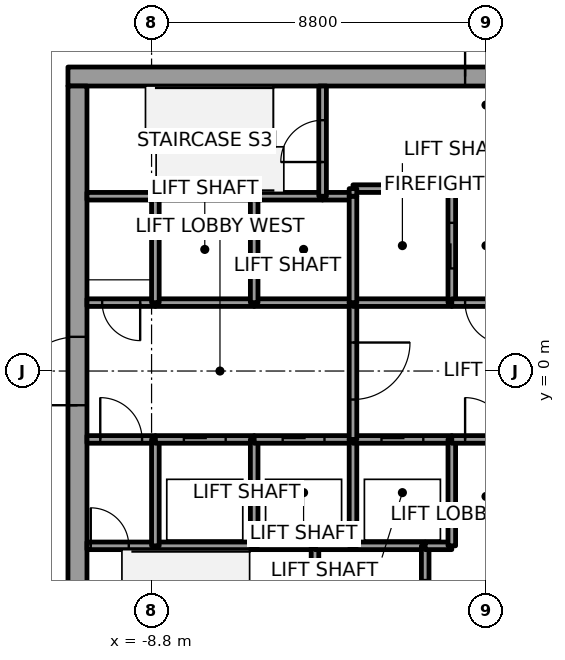
"""IFC4 building model, lengths in metres.
Left out: names, types, materials, properties, quantities, classifications, styles, units other than length and angle.
Written with IfcOpenShell. Run it as: python <this file> out.ifc"""

import sys

from ifc_helpers import new_model, si_unit, direction, frame, frame_2d, origin, place, context, subcontext, project, spatial, rectangle, extrude, element, fill, save


model = new_model("IFC4")
c1 = context("Model", 3, precision=1e-05, world=origin(), true_north=direction((0.0, 1.0)))
c2 = subcontext(c1, "Body", "Model", "MODEL_VIEW")
j1 = project(units=[si_unit("LENGTHUNIT", "METRE"), si_unit("PLANEANGLEUNIT", "RADIAN")], contexts=[c1])
p1 = place(None, origin())
s1 = spatial("IfcSite", under=j1, at=p1, CompositionType="ELEMENT")
p2 = place(p1, origin())
s2 = spatial("IfcBuilding", under=s1, at=p2, CompositionType="ELEMENT")
p3 = place(p2, frame((0.0, 0.0, 209.8)))
s3 = spatial("IfcBuildingStorey", under=s2, at=p3, CompositionType="ELEMENT", Elevation=209.8)
p4 = place(p3, frame((-11.0, 7.75, 0.0), z_axis=(0.0, 0.0, 1.0), x_axis=(1.0, 0.0, 0.0)))
e1 = element("IfcWall", 1, at=p4, inside=s3, PredefinedType="SHEAR", context=c2, shape_type="SweptSolid", body=[
    extrude(rectangle(XDim=22.0, YDim=0.5, at=frame_2d((11.0, 0.0))), origin(), (0.0, 0.0, 1.0), 4.0),
])
p5 = place(p4, frame((10.45, 0.0, 0.0)))
e2 = element("IfcOpeningElement", 2, at=p5, cuts=e1, PredefinedType="OPENING", context=c2, shape_type="SweptSolid", body=[
    extrude(rectangle(XDim=1.1, YDim=2.1, at=frame_2d((0.55, 1.05))), frame((0.0, 0.25, 0.0), z_axis=(0.0, -1.0, 0.0), x_axis=(1.0, 0.0, 0.0)), (0.0, 0.0, 1.0), 0.5),
])
p6 = place(p3, frame((-10.75, -7.5, 0.0), z_axis=(0.0, 0.0, 1.0), x_axis=(0.0, 1.0, 0.0)))
e3 = element("IfcWall", 3, at=p6, inside=s3, PredefinedType="SHEAR", context=c2, shape_type="SweptSolid", body=[
    extrude(rectangle(XDim=15.0, YDim=0.5, at=frame_2d((7.5, 0.0))), origin(), (0.0, 0.0, 1.0), 4.0),
])
p7 = place(p6, frame((6.6, 0.0, 0.0)))
e4 = element("IfcOpeningElement", 4, at=p7, cuts=e3, PredefinedType="OPENING", context=c2, shape_type="SweptSolid", body=[
    extrude(rectangle(XDim=1.8, YDim=2.1, at=frame_2d((0.9, 1.05))), frame((0.0, 0.25, 0.0), z_axis=(0.0, -1.0, 0.0), x_axis=(1.0, 0.0, 0.0)), (0.0, 0.0, 1.0), 0.5),
])
p8 = place(p3, frame((-10.5, -4.6, 0.0), z_axis=(0.0, 0.0, 1.0), x_axis=(1.0, 0.0, 0.0)))
e5 = element("IfcWall", 5, at=p8, inside=s3, PredefinedType="SOLIDWALL", context=c2, shape_type="SweptSolid", body=[
    extrude(rectangle(XDim=1.8, YDim=0.2, at=frame_2d((0.9, 0.0))), origin(), (0.0, 0.0, 1.0), 3.85),
])
p9 = place(p8, frame((0.1, 0.0, 0.0)))
e6 = element("IfcOpeningElement", 6, at=p9, cuts=e5, PredefinedType="OPENING", context=c2, shape_type="SweptSolid", body=[
    extrude(rectangle(XDim=1.0, YDim=2.1, at=frame_2d((0.5, 1.05))), frame((0.0, 0.1, 0.0), z_axis=(0.0, -1.0, 0.0), x_axis=(1.0, 0.0, 0.0)), (0.0, 0.0, 1.0), 0.2),
])
p10 = place(p3, frame((-10.5, -1.8, 0.0), z_axis=(0.0, 0.0, 1.0), x_axis=(1.0, 0.0, 0.0)))
e7 = element("IfcWall", 7, at=p10, inside=s3, PredefinedType="SOLIDWALL", context=c2, shape_type="SweptSolid", body=[
    extrude(rectangle(XDim=1.8, YDim=0.2, at=frame_2d((0.9, 0.0))), origin(), (0.0, 0.0, 1.0), 3.85),
])
p11 = place(p10, frame((0.35, 0.0, 0.0)))
e8 = element("IfcOpeningElement", 8, at=p11, cuts=e7, PredefinedType="OPENING", context=c2, shape_type="SweptSolid", body=[
    extrude(rectangle(XDim=1.1, YDim=2.1, at=frame_2d((0.55, 1.05))), frame((0.0, 0.1, 0.0), z_axis=(0.0, -1.0, 0.0), x_axis=(1.0, 0.0, 0.0)), (0.0, 0.0, 1.0), 0.2),
])
p12 = place(p3, frame((-8.7, 1.8, 0.0), z_axis=(0.0, 0.0, 1.0), x_axis=(-1.0, 0.0, 0.0)))
e9 = element("IfcWall", 9, at=p12, inside=s3, PredefinedType="SOLIDWALL", context=c2, shape_type="SweptSolid", body=[
    extrude(rectangle(XDim=1.8, YDim=0.2, at=frame_2d((0.9, 0.0))), origin(), (0.0, 0.0, 1.0), 3.85),
])
p13 = place(p12, frame((0.4, 0.0, 0.0)))
e10 = element("IfcOpeningElement", 10, at=p13, cuts=e9, PredefinedType="OPENING", context=c2, shape_type="SweptSolid", body=[
    extrude(rectangle(XDim=1.0, YDim=2.1, at=frame_2d((0.5, 1.05))), frame((0.0, 0.1, 0.0), z_axis=(0.0, -1.0, 0.0), x_axis=(1.0, 0.0, 0.0)), (0.0, 0.0, 1.0), 0.2),
])
p14 = place(p3, frame((-8.7, 4.6, 0.0), z_axis=(0.0, 0.0, 1.0), x_axis=(-1.0, 0.0, 0.0)))
e11 = element("IfcWall", 11, at=p14, inside=s3, PredefinedType="SOLIDWALL", context=c2, shape_type="SweptSolid", body=[
    extrude(rectangle(XDim=1.8, YDim=0.2, at=frame_2d((0.9, 0.0))), origin(), (0.0, 0.0, 1.0), 3.85),
])
p15 = place(p3, frame((-8.7, -4.6, 0.0), z_axis=(0.0, 0.0, 1.0), x_axis=(1.0, 0.0, 0.0)))
e12 = element("IfcWall", 12, at=p15, inside=s3, PredefinedType="SOLIDWALL", context=c2, shape_type="SweptSolid", body=[
    extrude(rectangle(XDim=2.6, YDim=0.2, at=frame_2d((1.3, 0.0))), origin(), (0.0, 0.0, 1.0), 3.85),
])
p16 = place(p3, frame((-8.7, -4.6, 0.0), z_axis=(0.0, 0.0, 1.0), x_axis=(0.0, 1.0, 0.0)))
e13 = element("IfcWall", 13, at=p16, inside=s3, PredefinedType="SOLIDWALL", context=c2, shape_type="SweptSolid", body=[
    extrude(rectangle(XDim=2.8, YDim=0.2, at=frame_2d((1.4, 0.0))), origin(), (0.0, 0.0, 1.0), 3.85),
])
p17 = place(p3, frame((-8.7, -1.8, 0.0), z_axis=(0.0, 0.0, 1.0), x_axis=(1.0, 0.0, 0.0)))
e14 = element("IfcWall", 14, at=p17, inside=s3, PredefinedType="SOLIDWALL", context=c2, shape_type="SweptSolid", body=[
    extrude(rectangle(XDim=2.6, YDim=0.2, at=frame_2d((1.3, 0.0))), origin(), (0.0, 0.0, 1.0), 3.85),
])
p18 = place(p17, frame((0.75, 0.0, 0.0)))
e15 = element("IfcOpeningElement", 15, at=p18, cuts=e14, PredefinedType="OPENING", context=c2, shape_type="SweptSolid", body=[
    extrude(rectangle(XDim=1.1, YDim=2.1, at=frame_2d((0.55, 1.05))), frame((0.0, 0.1, 0.0), z_axis=(0.0, -1.0, 0.0), x_axis=(1.0, 0.0, 0.0)), (0.0, 0.0, 1.0), 0.2),
])
p19 = place(p3, frame((-6.1, 1.8, 0.0), z_axis=(0.0, 0.0, 1.0), x_axis=(-1.0, 0.0, 0.0)))
e16 = element("IfcWall", 16, at=p19, inside=s3, PredefinedType="SOLIDWALL", context=c2, shape_type="SweptSolid", body=[
    extrude(rectangle(XDim=2.6, YDim=0.2, at=frame_2d((1.3, 0.0))), origin(), (0.0, 0.0, 1.0), 3.85),
])
p20 = place(p3, frame((-8.7, 1.8, 0.0), z_axis=(0.0, 0.0, 1.0), x_axis=(0.0, 1.0, 0.0)))
e17 = element("IfcWall", 17, at=p20, inside=s3, PredefinedType="SOLIDWALL", context=c2, shape_type="SweptSolid", body=[
    extrude(rectangle(XDim=2.8, YDim=0.2, at=frame_2d((1.4, 0.0))), origin(), (0.0, 0.0, 1.0), 3.85),
])
p21 = place(p3, frame((-6.1, 4.6, 0.0), z_axis=(0.0, 0.0, 1.0), x_axis=(-1.0, 0.0, 0.0)))
e18 = element("IfcWall", 18, at=p21, inside=s3, PredefinedType="SOLIDWALL", context=c2, shape_type="SweptSolid", body=[
    extrude(rectangle(XDim=2.6, YDim=0.2, at=frame_2d((1.3, 0.0))), origin(), (0.0, 0.0, 1.0), 3.85),
])
p22 = place(p3, frame((-6.1, -4.6, 0.0), z_axis=(0.0, 0.0, 1.0), x_axis=(1.0, 0.0, 0.0)))
e19 = element("IfcWall", 19, at=p22, inside=s3, PredefinedType="SOLIDWALL", context=c2, shape_type="SweptSolid", body=[
    extrude(rectangle(XDim=1.6, YDim=0.2, at=frame_2d((0.8, 0.0))), origin(), (0.0, 0.0, 1.0), 3.85),
])
p23 = place(p3, frame((-6.1, -4.6, 0.0), z_axis=(0.0, 0.0, 1.0), x_axis=(0.0, 1.0, 0.0)))
e20 = element("IfcWall", 20, at=p23, inside=s3, PredefinedType="SOLIDWALL", context=c2, shape_type="SweptSolid", body=[
    extrude(rectangle(XDim=2.8, YDim=0.2, at=frame_2d((1.4, 0.0))), origin(), (0.0, 0.0, 1.0), 3.85),
])
p24 = place(p3, frame((-6.1, -1.8, 0.0), z_axis=(0.0, 0.0, 1.0), x_axis=(1.0, 0.0, 0.0)))
e21 = element("IfcWall", 21, at=p24, inside=s3, PredefinedType="SOLIDWALL", context=c2, shape_type="SweptSolid", body=[
    extrude(rectangle(XDim=2.6, YDim=0.2, at=frame_2d((1.3, 0.0))), origin(), (0.0, 0.0, 1.0), 3.85),
])
p25 = place(p24, frame((0.75, 0.0, 0.0)))
e22 = element("IfcOpeningElement", 22, at=p25, cuts=e21, PredefinedType="OPENING", context=c2, shape_type="SweptSolid", body=[
    extrude(rectangle(XDim=1.1, YDim=2.1, at=frame_2d((0.55, 1.05))), frame((0.0, 0.1, 0.0), z_axis=(0.0, -1.0, 0.0), x_axis=(1.0, 0.0, 0.0)), (0.0, 0.0, 1.0), 0.2),
])
p26 = place(p3, frame((-3.5, 1.8, 0.0), z_axis=(0.0, 0.0, 1.0), x_axis=(-1.0, 0.0, 0.0)))
e23 = element("IfcWall", 23, at=p26, inside=s3, PredefinedType="SOLIDWALL", context=c2, shape_type="SweptSolid", body=[
    extrude(rectangle(XDim=2.6, YDim=0.2, at=frame_2d((1.3, 0.0))), origin(), (0.0, 0.0, 1.0), 3.85),
])
p27 = place(p3, frame((-6.1, 1.8, 0.0), z_axis=(0.0, 0.0, 1.0), x_axis=(0.0, 1.0, 0.0)))
e24 = element("IfcWall", 24, at=p27, inside=s3, PredefinedType="SOLIDWALL", context=c2, shape_type="SweptSolid", body=[
    extrude(rectangle(XDim=2.8, YDim=0.2, at=frame_2d((1.4, 0.0))), origin(), (0.0, 0.0, 1.0), 3.85),
])
p28 = place(p3, frame((-4.3, 4.6, 0.0), z_axis=(0.0, 0.0, 1.0), x_axis=(-1.0, 0.0, 0.0)))
e25 = element("IfcWall", 25, at=p28, inside=s3, PredefinedType="SOLIDWALL", context=c2, shape_type="SweptSolid", body=[
    extrude(rectangle(XDim=1.8, YDim=0.2, at=frame_2d((0.9, 0.0))), origin(), (0.0, 0.0, 1.0), 3.85),
])
p29 = place(p3, frame((-4.5, -4.6, 0.0), z_axis=(0.0, 0.0, 1.0), x_axis=(0.0, -1.0, 0.0)))
e26 = element("IfcWall", 26, at=p29, inside=s3, PredefinedType="SOLIDWALL", context=c2, shape_type="SweptSolid", body=[
    extrude(rectangle(XDim=2.9, YDim=0.2, at=frame_2d((1.45, 0.0))), origin(), (0.0, 0.0, 1.0), 3.85),
])
p30 = place(p3, frame((-4.5, -4.6, 0.0), z_axis=(0.0, 0.0, 1.0), x_axis=(1.0, 0.0, 0.0)))
e27 = element("IfcWall", 27, at=p30, inside=s3, PredefinedType="SOLIDWALL", context=c2, shape_type="SweptSolid", body=[
    extrude(rectangle(XDim=1.0, YDim=0.2, at=frame_2d((0.5, 0.0))), origin(), (0.0, 0.0, 1.0), 3.85),
])
p31 = place(p3, frame((-3.5, 4.6, 0.0), z_axis=(0.0, 0.0, 1.0), x_axis=(-1.0, 0.0, 0.0)))
e28 = element("IfcWall", 28, at=p31, inside=s3, PredefinedType="SOLIDWALL", context=c2, shape_type="SweptSolid", body=[
    extrude(rectangle(XDim=0.8, YDim=0.2, at=frame_2d((0.4, 0.0))), origin(), (0.0, 0.0, 1.0), 3.85),
])
p32 = place(p3, frame((-4.3, 4.6, 0.0), z_axis=(0.0, 0.0, 1.0), x_axis=(0.0, 1.0, 0.0)))
e29 = element("IfcWall", 29, at=p32, inside=s3, PredefinedType="SOLIDWALL", context=c2, shape_type="SweptSolid", body=[
    extrude(rectangle(XDim=2.9, YDim=0.2, at=frame_2d((1.45, 0.0))), origin(), (0.0, 0.0, 1.0), 3.85),
])
p33 = place(p32, frame((0.9, 0.0, 0.0)))
e30 = element("IfcOpeningElement", 30, at=p33, cuts=e29, PredefinedType="OPENING", context=c2, shape_type="SweptSolid", body=[
    extrude(rectangle(XDim=1.1, YDim=2.1, at=frame_2d((0.55, 1.05))), frame((0.0, 0.1, 0.0), z_axis=(0.0, -1.0, 0.0), x_axis=(1.0, 0.0, 0.0)), (0.0, 0.0, 1.0), 0.2),
])
p34 = place(p3, frame((-3.5, -4.6, 0.0), z_axis=(0.0, 0.0, 1.0), x_axis=(1.0, 0.0, 0.0)))
e31 = element("IfcWall", 31, at=p34, inside=s3, PredefinedType="SOLIDWALL", context=c2, shape_type="SweptSolid", body=[
    extrude(rectangle(XDim=1.9, YDim=0.2, at=frame_2d((0.95, 0.0))), origin(), (0.0, 0.0, 1.0), 3.85),
])
p35 = place(p3, frame((-3.5, -4.6, 0.0), z_axis=(0.0, 0.0, 1.0), x_axis=(0.0, 1.0, 0.0)))
e32 = element("IfcWall", 32, at=p35, inside=s3, PredefinedType="SOLIDWALL", context=c2, shape_type="SweptSolid", body=[
    extrude(rectangle(XDim=2.8, YDim=0.2, at=frame_2d((1.4, 0.0))), origin(), (0.0, 0.0, 1.0), 3.85),
])
p36 = place(p3, frame((-3.5, -1.8, 0.0), z_axis=(0.0, 0.0, 1.0), x_axis=(1.0, 0.0, 0.0)))
e33 = element("IfcWall", 33, at=p36, inside=s3, PredefinedType="SOLIDWALL", context=c2, shape_type="SweptSolid", body=[
    extrude(rectangle(XDim=2.6, YDim=0.2, at=frame_2d((1.3, 0.0))), origin(), (0.0, 0.0, 1.0), 3.85),
])
p37 = place(p36, frame((0.75, 0.0, 0.0)))
e34 = element("IfcOpeningElement", 34, at=p37, cuts=e33, PredefinedType="OPENING", context=c2, shape_type="SweptSolid", body=[
    extrude(rectangle(XDim=1.1, YDim=2.1, at=frame_2d((0.55, 1.05))), frame((0.0, 0.1, 0.0), z_axis=(0.0, -1.0, 0.0), x_axis=(1.0, 0.0, 0.0)), (0.0, 0.0, 1.0), 0.2),
])
p38 = place(p3, frame((-3.5, 1.8, 0.0), z_axis=(0.0, 0.0, 1.0), x_axis=(0.0, -1.0, 0.0)))
e35 = element("IfcWall", 35, at=p38, inside=s3, PredefinedType="SOLIDWALL", context=c2, shape_type="SweptSolid", body=[
    extrude(rectangle(XDim=3.6, YDim=0.2, at=frame_2d((1.8, 0.0))), origin(), (0.0, 0.0, 1.0), 3.85),
])
p39 = place(p38, frame((1.05, 0.0, 0.0)))
e36 = element("IfcOpeningElement", 36, at=p39, cuts=e35, PredefinedType="OPENING", context=c2, shape_type="SweptSolid", body=[
    extrude(rectangle(XDim=1.5, YDim=2.1, at=frame_2d((0.75, 1.05))), frame((0.0, 0.1, 0.0), z_axis=(0.0, -1.0, 0.0), x_axis=(1.0, 0.0, 0.0)), (0.0, 0.0, 1.0), 0.2),
])
p40 = place(p3, frame((-0.9, 1.8, 0.0), z_axis=(0.0, 0.0, 1.0), x_axis=(-1.0, 0.0, 0.0)))
e37 = element("IfcWall", 37, at=p40, inside=s3, PredefinedType="SOLIDWALL", context=c2, shape_type="SweptSolid", body=[
    extrude(rectangle(XDim=2.6, YDim=0.2, at=frame_2d((1.3, 0.0))), origin(), (0.0, 0.0, 1.0), 3.85),
])
p41 = place(p3, frame((-3.5, 4.6, 0.0), z_axis=(0.0, 0.0, 1.0), x_axis=(0.0, -1.0, 0.0)))
e38 = element("IfcWall", 38, at=p41, inside=s3, PredefinedType="SOLIDWALL", context=c2, shape_type="SweptSolid", body=[
    extrude(rectangle(XDim=2.8, YDim=0.2, at=frame_2d((1.4, 0.0))), origin(), (0.0, 0.0, 1.0), 3.85),
])
p42 = place(p3, frame((-0.9, 1.8, 0.0), z_axis=(0.0, 0.0, 1.0), x_axis=(0.0, 1.0, 0.0)))
e39 = element("IfcWall", 39, at=p42, inside=s3, PredefinedType="SOLIDWALL", context=c2, shape_type="SweptSolid", body=[
    extrude(rectangle(XDim=3.0, YDim=0.2, at=frame_2d((1.5, 0.0))), origin(), (0.0, 0.0, 1.0), 3.85),
])
p43 = place(p42, frame((0.9, 0.0, 0.0)))
e40 = element("IfcOpeningElement", 40, at=p43, cuts=e39, PredefinedType="OPENING", context=c2, shape_type="SweptSolid", body=[
    extrude(rectangle(XDim=1.2, YDim=2.1, at=frame_2d((0.6, 1.05))), frame((0.0, 0.1, 0.0), z_axis=(0.0, -1.0, 0.0), x_axis=(1.0, 0.0, 0.0)), (0.0, 0.0, 1.0), 0.2),
])
p44 = place(p3, frame((-0.9, 4.8, 0.0), z_axis=(0.0, 0.0, 1.0), x_axis=(-1.0, 0.0, 0.0)))
e41 = element("IfcWall", 41, at=p44, inside=s3, PredefinedType="SOLIDWALL", context=c2, shape_type="SweptSolid", body=[
    extrude(rectangle(XDim=2.6, YDim=0.2, at=frame_2d((1.3, 0.0))), origin(), (0.0, 0.0, 1.0), 3.85),
])
p45 = place(p3, frame((-3.5, 4.8, 0.0), z_axis=(0.0, 0.0, 1.0), x_axis=(0.0, -1.0, 0.0)))
e42 = element("IfcWall", 42, at=p45, inside=s3, PredefinedType="SOLIDWALL", context=c2, shape_type="SweptSolid", body=[
    extrude(rectangle(XDim=0.2, YDim=0.2, at=frame_2d((0.1, 0.0))), origin(), (0.0, 0.0, 1.0), 3.85),
])
p46 = place(p3, frame((-1.6, -7.5, 0.0), z_axis=(0.0, 0.0, 1.0), x_axis=(0.0, 1.0, 0.0)))
e43 = element("IfcWall", 43, at=p46, inside=s3, PredefinedType="SOLIDWALL", context=c2, shape_type="SweptSolid", body=[
    extrude(rectangle(XDim=2.9, YDim=0.2, at=frame_2d((1.45, 0.0))), origin(), (0.0, 0.0, 1.0), 3.85),
])
p47 = place(p46, frame((0.9, 0.0, 0.0)))
e44 = element("IfcOpeningElement", 44, at=p47, cuts=e43, PredefinedType="OPENING", context=c2, shape_type="SweptSolid", body=[
    extrude(rectangle(XDim=1.1, YDim=2.1, at=frame_2d((0.55, 1.05))), frame((0.0, 0.1, 0.0), z_axis=(0.0, -1.0, 0.0), x_axis=(1.0, 0.0, 0.0)), (0.0, 0.0, 1.0), 0.2),
])
p48 = place(p3, frame((-1.6, -4.6, 0.0), z_axis=(0.0, 0.0, 1.0), x_axis=(1.0, 0.0, 0.0)))
e45 = element("IfcWall", 45, at=p48, inside=s3, PredefinedType="SOLIDWALL", context=c2, shape_type="SweptSolid", body=[
    extrude(rectangle(XDim=0.7, YDim=0.2, at=frame_2d((0.35, 0.0))), origin(), (0.0, 0.0, 1.0), 3.85),
])
p49 = place(p3, frame((-0.9, -4.6, 0.0), z_axis=(0.0, 0.0, 1.0), x_axis=(0.0, 1.0, 0.0)))
e46 = element("IfcWall", 46, at=p49, inside=s3, PredefinedType="SOLIDWALL", context=c2, shape_type="SweptSolid", body=[
    extrude(rectangle(XDim=2.8, YDim=0.2, at=frame_2d((1.4, 0.0))), origin(), (0.0, 0.0, 1.0), 3.85),
])
p50 = place(p3, frame((-0.9, -1.8, 0.0), z_axis=(0.0, 0.0, 1.0), x_axis=(1.0, 0.0, 0.0)))
e47 = element("IfcWall", 47, at=p50, inside=s3, PredefinedType="SOLIDWALL", context=c2, shape_type="SweptSolid", body=[
    extrude(rectangle(XDim=1.8, YDim=0.2, at=frame_2d((0.9, 0.0))), origin(), (0.0, 0.0, 1.0), 3.85),
])
p51 = place(p50, frame((0.35, 0.0, 0.0)))
e48 = element("IfcOpeningElement", 48, at=p51, cuts=e47, PredefinedType="OPENING", context=c2, shape_type="SweptSolid", body=[
    extrude(rectangle(XDim=1.1, YDim=2.1, at=frame_2d((0.55, 1.05))), frame((0.0, 0.1, 0.0), z_axis=(0.0, -1.0, 0.0), x_axis=(1.0, 0.0, 0.0)), (0.0, 0.0, 1.0), 0.2),
])
p52 = place(p3, frame((0.9, 1.8, 0.0), z_axis=(0.0, 0.0, 1.0), x_axis=(-1.0, 0.0, 0.0)))
e49 = element("IfcWall", 49, at=p52, inside=s3, PredefinedType="SOLIDWALL", context=c2, shape_type="SweptSolid", body=[
    extrude(rectangle(XDim=1.8, YDim=0.2, at=frame_2d((0.9, 0.0))), origin(), (0.0, 0.0, 1.0), 3.85),
])
p53 = place(p52, frame((0.35, 0.0, 0.0)))
e50 = element("IfcOpeningElement", 50, at=p53, cuts=e49, PredefinedType="OPENING", context=c2, shape_type="SweptSolid", body=[
    extrude(rectangle(XDim=1.1, YDim=2.1, at=frame_2d((0.55, 1.05))), frame((0.0, 0.1, 0.0), z_axis=(0.0, -1.0, 0.0), x_axis=(1.0, 0.0, 0.0)), (0.0, 0.0, 1.0), 0.2),
])
p54 = place(p18, origin())
e51 = element("IfcDoor", 51, at=p54, inside=s3, OperationType="SLIDING_TO_RIGHT", PredefinedType="DOOR", context=c2, shape_type="SweptSolid", body=[
    extrude(rectangle(XDim=1.1, YDim=2.1, at=frame_2d((0.55, 1.05))), frame((0.0, 0.025, 0.0), z_axis=(0.0, -1.0, 0.0), x_axis=(1.0, 0.0, 0.0)), (0.0, 0.0, 1.0), 0.05),
])
fill(e15, e51)
p55 = place(p25, origin())
e52 = element("IfcDoor", 52, at=p55, inside=s3, OperationType="SLIDING_TO_RIGHT", PredefinedType="DOOR", context=c2, shape_type="SweptSolid", body=[
    extrude(rectangle(XDim=1.1, YDim=2.1, at=frame_2d((0.55, 1.05))), frame((0.0, 0.025, 0.0), z_axis=(0.0, -1.0, 0.0), x_axis=(1.0, 0.0, 0.0)), (0.0, 0.0, 1.0), 0.05),
])
fill(e22, e52)
p56 = place(p37, origin())
e53 = element("IfcDoor", 53, at=p56, inside=s3, OperationType="SLIDING_TO_LEFT", PredefinedType="DOOR", context=c2, shape_type="SweptSolid", body=[
    extrude(rectangle(XDim=1.1, YDim=2.1, at=frame_2d((0.55, 1.05))), frame((0.0, 0.025, 0.0), z_axis=(0.0, -1.0, 0.0), x_axis=(1.0, 0.0, 0.0)), (0.0, 0.0, 1.0), 0.05),
])
fill(e34, e53)
p57 = place(p43, origin())
e54 = element("IfcDoor", 54, at=p57, inside=s3, OperationType="SLIDING_TO_LEFT", PredefinedType="DOOR", context=c2, shape_type="SweptSolid", body=[
    extrude(rectangle(XDim=1.2, YDim=2.1, at=frame_2d((0.6, 1.05))), frame((0.0, 0.025, 0.0), z_axis=(0.0, -1.0, 0.0), x_axis=(1.0, 0.0, 0.0)), (0.0, 0.0, 1.0), 0.05),
])
fill(e40, e54)
p58 = place(p39, origin())
e55 = element("IfcDoor", 55, at=p58, inside=s3, OperationType="DOUBLE_DOOR_SINGLE_SWING", PredefinedType="DOOR", context=c2, shape_type="SweptSolid", body=[
    extrude(rectangle(XDim=1.5, YDim=2.1, at=frame_2d((0.75, 1.05))), frame((0.0, 0.025, 0.0), z_axis=(0.0, -1.0, 0.0), x_axis=(1.0, 0.0, 0.0)), (0.0, 0.0, 1.0), 0.05),
])
fill(e36, e55)
p59 = place(p11, origin())
e56 = element("IfcDoor", 56, at=p59, inside=s3, OperationType="SINGLE_SWING_RIGHT", PredefinedType="DOOR", context=c2, shape_type="SweptSolid", body=[
    extrude(rectangle(XDim=1.1, YDim=2.1, at=frame_2d((0.55, 1.05))), frame((0.0, 0.025, 0.0), z_axis=(0.0, -1.0, 0.0), x_axis=(1.0, 0.0, 0.0)), (0.0, 0.0, 1.0), 0.05),
])
fill(e8, e56)
p60 = place(p53, origin())
e57 = element("IfcDoor", 57, at=p60, inside=s3, OperationType="SINGLE_SWING_RIGHT", PredefinedType="DOOR", context=c2, shape_type="SweptSolid", body=[
    extrude(rectangle(XDim=1.1, YDim=2.1, at=frame_2d((0.55, 1.05))), frame((0.0, 0.025, 0.0), z_axis=(0.0, -1.0, 0.0), x_axis=(1.0, 0.0, 0.0)), (0.0, 0.0, 1.0), 0.05),
])
fill(e50, e57)
p61 = place(p51, origin())
e58 = element("IfcDoor", 58, at=p61, inside=s3, OperationType="SINGLE_SWING_RIGHT", PredefinedType="DOOR", context=c2, shape_type="SweptSolid", body=[
    extrude(rectangle(XDim=1.1, YDim=2.1, at=frame_2d((0.55, 1.05))), frame((0.0, 0.025, 0.0), z_axis=(0.0, -1.0, 0.0), x_axis=(1.0, 0.0, 0.0)), (0.0, 0.0, 1.0), 0.05),
])
fill(e48, e58)
p62 = place(p13, origin())
e59 = element("IfcDoor", 59, at=p62, inside=s3, OperationType="SINGLE_SWING_RIGHT", PredefinedType="DOOR", context=c2, shape_type="SweptSolid", body=[
    extrude(rectangle(XDim=1.0, YDim=2.1, at=frame_2d((0.5, 1.05))), frame((0.0, 0.025, 0.0), z_axis=(0.0, -1.0, 0.0), x_axis=(1.0, 0.0, 0.0)), (0.0, 0.0, 1.0), 0.05),
])
fill(e10, e59)
p63 = place(p9, origin())
e60 = element("IfcDoor", 60, at=p63, inside=s3, OperationType="SINGLE_SWING_LEFT", PredefinedType="DOOR", context=c2, shape_type="SweptSolid", body=[
    extrude(rectangle(XDim=1.0, YDim=2.1, at=frame_2d((0.5, 1.05))), frame((0.0, 0.025, 0.0), z_axis=(0.0, -1.0, 0.0), x_axis=(1.0, 0.0, 0.0)), (0.0, 0.0, 1.0), 0.05),
])
fill(e6, e60)
p64 = place(p33, origin())
e61 = element("IfcDoor", 61, at=p64, inside=s3, OperationType="SINGLE_SWING_RIGHT", PredefinedType="DOOR", context=c2, shape_type="SweptSolid", body=[
    extrude(rectangle(XDim=1.1, YDim=2.1, at=frame_2d((0.55, 1.05))), frame((0.0, 0.025, 0.0), z_axis=(0.0, -1.0, 0.0), x_axis=(1.0, 0.0, 0.0)), (0.0, 0.0, 1.0), 0.05),
])
fill(e30, e61)
p65 = place(p7, origin())
e62 = element("IfcDoor", 62, at=p65, inside=s3, OperationType="DOUBLE_DOOR_SINGLE_SWING", PredefinedType="DOOR", context=c2, shape_type="SweptSolid", body=[
    extrude(rectangle(XDim=1.8, YDim=2.1, at=frame_2d((0.9, 1.05))), frame((0.0, 0.025, 0.0), z_axis=(0.0, -1.0, 0.0), x_axis=(1.0, 0.0, 0.0)), (0.0, 0.0, 1.0), 0.05),
])
fill(e4, e62)
p66 = place(p5, origin())
e63 = element("IfcDoor", 63, at=p66, inside=s3, OperationType="SINGLE_SWING_LEFT", PredefinedType="DOOR", context=c2, shape_type="SweptSolid", body=[
    extrude(rectangle(XDim=1.1, YDim=2.1, at=frame_2d((0.55, 1.05))), frame((0.0, 0.025, 0.0), z_axis=(0.0, -1.0, 0.0), x_axis=(1.0, 0.0, 0.0)), (0.0, 0.0, 1.0), 0.05),
])
fill(e2, e63)
save(model, sys.argv[1])
